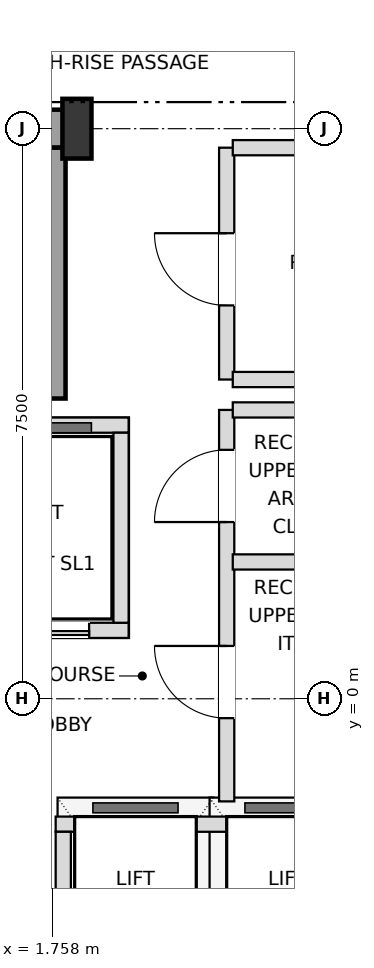
"""IFC4 building model, lengths in metres.
Left out: names, types, materials, properties, quantities, classifications, styles, units other than length and angle.
Written with IfcOpenShell. Run it as: python <this file> out.ifc"""

import sys

from ifc_helpers import new_model, si_unit, direction, frame, frame_2d, origin, origin_2d, place, context, subcontext, project, spatial, rectangle, i_section, extrude, element, fill, save


model = new_model("IFC4")
c1 = context("Model", 3, precision=1e-05, world=origin(), true_north=direction((0.0, 1.0)))
c2 = subcontext(c1, "Body", "Model", "MODEL_VIEW")
j1 = project(units=[si_unit("LENGTHUNIT", "METRE"), si_unit("PLANEANGLEUNIT", "RADIAN")], contexts=[c1])
p1 = place(None, origin())
s1 = spatial("IfcSite", under=j1, at=p1, CompositionType="ELEMENT")
p2 = place(p1, origin())
s2 = spatial("IfcBuilding", under=s1, at=p2, CompositionType="ELEMENT")
p3 = place(p2, frame((0.0, 0.0, 301.5)))
s3 = spatial("IfcBuildingStorey", under=s2, at=p3, CompositionType="ELEMENT", Elevation=301.5)
p4 = place(p3, frame((2.08, 7.5, 0.0), z_axis=(0.0, 0.0, 1.0), x_axis=(1.0, 0.0, 0.0)))
e1 = element("IfcColumn", 1, at=p4, inside=s3, PredefinedType="COLUMN", context=c2, shape_type="SweptSolid", body=[
    extrude(i_section(OverallWidth=0.382, OverallDepth=0.786, WebThickness=0.02, FlangeThickness=0.033, at=origin_2d()), origin(), (0.0, 0.0, 1.0), 3.6),
])
p5 = place(p3, frame((0.0, 7.5, 0.0), z_axis=(0.0, 0.0, 1.0), x_axis=(1.0, 0.0, 0.0)))
e2 = element("IfcWall", 2, at=p5, inside=s3, PredefinedType="SHEAR", context=c2, shape_type="SweptSolid", body=[
    extrude(rectangle(XDim=2.08, YDim=0.5, at=frame_2d((1.04, 0.0))), origin(), (0.0, 0.0, 1.0), 3.3),
])
p6 = place(p3, frame((1.73, 3.95, 0.0), z_axis=(0.0, 0.0, 1.0), x_axis=(0.0, 1.0, 0.0)))
e3 = element("IfcWall", 3, at=p6, inside=s3, PredefinedType="SHEAR", context=c2, shape_type="SweptSolid", body=[
    extrude(rectangle(XDim=3.3, YDim=0.4, at=frame_2d((1.65, 0.0))), origin(), (0.0, 0.0, 1.0), 3.3),
])
p7 = place(p3, frame((-2.82, 0.9, 0.0), z_axis=(0.0, 0.0, 1.0), x_axis=(1.0, 0.0, 0.0)))
e4 = element("IfcWall", 4, at=p7, inside=s3, PredefinedType="SOLIDWALL", context=c2, shape_type="SweptSolid", body=[
    extrude(rectangle(XDim=5.58, YDim=0.2, at=frame_2d((2.79, 0.0))), origin(), (0.0, 0.0, 1.0), 3.3),
])
p8 = place(p7, frame((0.49, 0.0, 0.0)))
e5 = element("IfcOpeningElement", 5, at=p8, cuts=e4, PredefinedType="OPENING", context=c2, shape_type="SweptSolid", body=[
    extrude(rectangle(XDim=1.1, YDim=2.15, at=frame_2d((0.55, 1.075))), frame((0.0, 0.11, 0.0), z_axis=(0.0, -1.0, 0.0), x_axis=(1.0, 0.0, 0.0)), (0.0, 0.0, 1.0), 0.22),
])
p9 = place(p7, frame((2.17, 0.0, 0.0)))
e6 = element("IfcOpeningElement", 6, at=p9, cuts=e4, PredefinedType="OPENING", context=c2, shape_type="SweptSolid", body=[
    extrude(rectangle(XDim=1.1, YDim=2.15, at=frame_2d((0.55, 1.075))), frame((0.0, 0.11, 0.0), z_axis=(0.0, -1.0, 0.0), x_axis=(1.0, 0.0, 0.0)), (0.0, 0.0, 1.0), 0.22),
])
p10 = place(p7, frame((3.86, 0.0, 0.0)))
e7 = element("IfcOpeningElement", 7, at=p10, cuts=e4, PredefinedType="OPENING", context=c2, shape_type="SweptSolid", body=[
    extrude(rectangle(XDim=1.2, YDim=2.2, at=frame_2d((0.6, 1.1))), frame((0.0, 0.11, 0.0), z_axis=(0.0, -1.0, 0.0), x_axis=(1.0, 0.0, 0.0)), (0.0, 0.0, 1.0), 0.22),
])
p11 = place(p3, frame((-2.82, 3.6, 0.0), z_axis=(0.0, 0.0, 1.0), x_axis=(1.0, 0.0, 0.0)))
e8 = element("IfcWall", 8, at=p11, inside=s3, PredefinedType="SOLIDWALL", context=c2, shape_type="SweptSolid", body=[
    extrude(rectangle(XDim=5.58, YDim=0.2, at=frame_2d((2.79, 0.0))), origin(), (0.0, 0.0, 1.0), 3.3),
])
p12 = place(p3, frame((2.66, 1.0, 0.0), z_axis=(0.0, 0.0, 1.0), x_axis=(0.0, 1.0, 0.0)))
e9 = element("IfcWall", 9, at=p12, inside=s3, PredefinedType="SOLIDWALL", context=c2, shape_type="SweptSolid", body=[
    extrude(rectangle(XDim=2.5, YDim=0.2, at=frame_2d((1.25, 0.0))), origin(), (0.0, 0.0, 1.0), 3.3),
])
p13 = place(p3, frame((1.8, -1.65, 0.0), z_axis=(0.0, 0.0, 1.0), x_axis=(1.0, 0.0, 0.0)))
e10 = element("IfcWall", 10, at=p13, inside=s3, PredefinedType="SOLIDWALL", context=c2, shape_type="SweptSolid", body=[
    extrude(rectangle(XDim=4.1, YDim=0.2, at=frame_2d((2.05, 0.0))), origin(), (0.0, 0.0, 1.0), 3.3),
])
p14 = place(p3, frame((1.9, -3.75, 0.0), z_axis=(0.0, 0.0, 1.0), x_axis=(0.0, 1.0, 0.0)))
e11 = element("IfcWall", 11, at=p14, inside=s3, PredefinedType="SOLIDWALL", context=c2, shape_type="SweptSolid", body=[
    extrude(rectangle(XDim=2.0, YDim=0.2, at=frame_2d((1.0, 0.0))), origin(), (0.0, 0.0, 1.0), 3.3),
])
p15 = place(p3, frame((4.05, -1.35, 0.0), z_axis=(0.0, 0.0, 1.0), x_axis=(0.0, 1.0, 0.0)))
e12 = element("IfcWall", 12, at=p15, inside=s3, PredefinedType="SOLIDWALL", context=c2, shape_type="SweptSolid", body=[
    extrude(rectangle(XDim=5.15, YDim=0.2, at=frame_2d((2.575, 0.0))), origin(), (0.0, 0.0, 1.0), 3.3),
])
p16 = place(p15, frame((1.095, 0.0, 0.0)))
e13 = element("IfcOpeningElement", 13, at=p16, cuts=e12, PredefinedType="OPENING", context=c2, shape_type="SweptSolid", body=[
    extrude(rectangle(XDim=0.95, YDim=2.15, at=frame_2d((0.475, 1.075))), frame((0.0, 0.11, 0.0), z_axis=(0.0, -1.0, 0.0), x_axis=(1.0, 0.0, 0.0)), (0.0, 0.0, 1.0), 0.22),
])
p17 = place(p15, frame((3.675, 0.0, 0.0)))
e14 = element("IfcOpeningElement", 14, at=p17, cuts=e12, PredefinedType="OPENING", context=c2, shape_type="SweptSolid", body=[
    extrude(rectangle(XDim=0.95, YDim=2.15, at=frame_2d((0.475, 1.075))), frame((0.0, 0.11, 0.0), z_axis=(0.0, -1.0, 0.0), x_axis=(1.0, 0.0, 0.0)), (0.0, 0.0, 1.0), 0.22),
])
p18 = place(p3, frame((4.05, 4.2, 0.0), z_axis=(0.0, 0.0, 1.0), x_axis=(0.0, 1.0, 0.0)))
e15 = element("IfcWall", 15, at=p18, inside=s3, PredefinedType="SOLIDWALL", context=c2, shape_type="SweptSolid", body=[
    extrude(rectangle(XDim=3.05, YDim=0.2, at=frame_2d((1.525, 0.0))), origin(), (0.0, 0.0, 1.0), 3.3),
])
p19 = place(p18, frame((0.975, 0.0, 0.0)))
e16 = element("IfcOpeningElement", 16, at=p19, cuts=e15, PredefinedType="OPENING", context=c2, shape_type="SweptSolid", body=[
    extrude(rectangle(XDim=0.95, YDim=2.15, at=frame_2d((0.475, 1.075))), frame((0.0, 0.11, 0.0), z_axis=(0.0, -1.0, 0.0), x_axis=(1.0, 0.0, 0.0)), (0.0, 0.0, 1.0), 0.22),
])
for number, where, z_axis, x_axis in (
    (17, (4.13, 1.8, 0.0), (0.0, 0.0, 1.0), (1.0, 0.0, 0.0)),
    (18, (4.13, 3.8, 0.0), (0.0, 0.0, 1.0), (1.0, 0.0, 0.0)),
):
    element("IfcWall", number, at=place(p3, frame(where, z_axis=z_axis, x_axis=x_axis)), inside=s3, PredefinedType="SOLIDWALL", context=c2, shape_type="SweptSolid", body=[
        extrude(rectangle(XDim=2.04, YDim=0.2, at=frame_2d((1.02, 0.0))), origin(), (0.0, 0.0, 1.0), 3.3),
    ])
p20 = place(p3, frame((4.13, 4.2, 0.0), z_axis=(0.0, 0.0, 1.0), x_axis=(1.0, 0.0, 0.0)))
e19 = element("IfcWall", 19, at=p20, inside=s3, PredefinedType="SOLIDWALL", context=c2, shape_type="SweptSolid", body=[
    extrude(rectangle(XDim=2.07, YDim=0.2, at=frame_2d((1.035, 0.0))), origin(), (0.0, 0.0, 1.0), 3.3),
])
p21 = place(p3, frame((4.13, 7.25, 0.0), z_axis=(0.0, 0.0, 1.0), x_axis=(1.0, 0.0, 0.0)))
e20 = element("IfcWall", 20, at=p21, inside=s3, PredefinedType="SOLIDWALL", context=c2, shape_type="SweptSolid", body=[
    extrude(rectangle(XDim=2.07, YDim=0.2, at=frame_2d((1.035, 0.0))), origin(), (0.0, 0.0, 1.0), 2.353),
])
p22 = place(p10, origin())
e21 = element("IfcDoor", 21, at=p22, inside=s3, OperationType="DOUBLE_DOOR_SLIDING", PredefinedType="DOOR", context=c2, shape_type="SweptSolid", body=[
    extrude(rectangle(XDim=1.2, YDim=2.2, at=frame_2d((0.6, 1.1))), frame((0.0, 0.025, 0.0), z_axis=(0.0, -1.0, 0.0), x_axis=(1.0, 0.0, 0.0)), (0.0, 0.0, 1.0), 0.05),
])
fill(e7, e21)
p23 = place(p16, origin())
e22 = element("IfcDoor", 22, at=p23, inside=s3, OperationType="SINGLE_SWING_RIGHT", PredefinedType="DOOR", context=c2, shape_type="SweptSolid", body=[
    extrude(rectangle(XDim=0.95, YDim=2.15, at=frame_2d((0.475, 1.075))), frame((0.0, 0.025, 0.0), z_axis=(0.0, -1.0, 0.0), x_axis=(1.0, 0.0, 0.0)), (0.0, 0.0, 1.0), 0.05),
])
fill(e13, e22)
p24 = place(p17, origin())
e23 = element("IfcDoor", 23, at=p24, inside=s3, OperationType="SINGLE_SWING_LEFT", PredefinedType="DOOR", context=c2, shape_type="SweptSolid", body=[
    extrude(rectangle(XDim=0.95, YDim=2.15, at=frame_2d((0.475, 1.075))), frame((0.0, 0.025, 0.0), z_axis=(0.0, -1.0, 0.0), x_axis=(1.0, 0.0, 0.0)), (0.0, 0.0, 1.0), 0.05),
])
fill(e14, e23)
p25 = place(p19, origin())
e24 = element("IfcDoor", 24, at=p25, inside=s3, OperationType="SINGLE_SWING_RIGHT", PredefinedType="DOOR", context=c2, shape_type="SweptSolid", body=[
    extrude(rectangle(XDim=0.95, YDim=2.15, at=frame_2d((0.475, 1.075))), frame((0.0, 0.025, 0.0), z_axis=(0.0, -1.0, 0.0), x_axis=(1.0, 0.0, 0.0)), (0.0, 0.0, 1.0), 0.05),
])
fill(e16, e24)
save(model, sys.argv[1])
